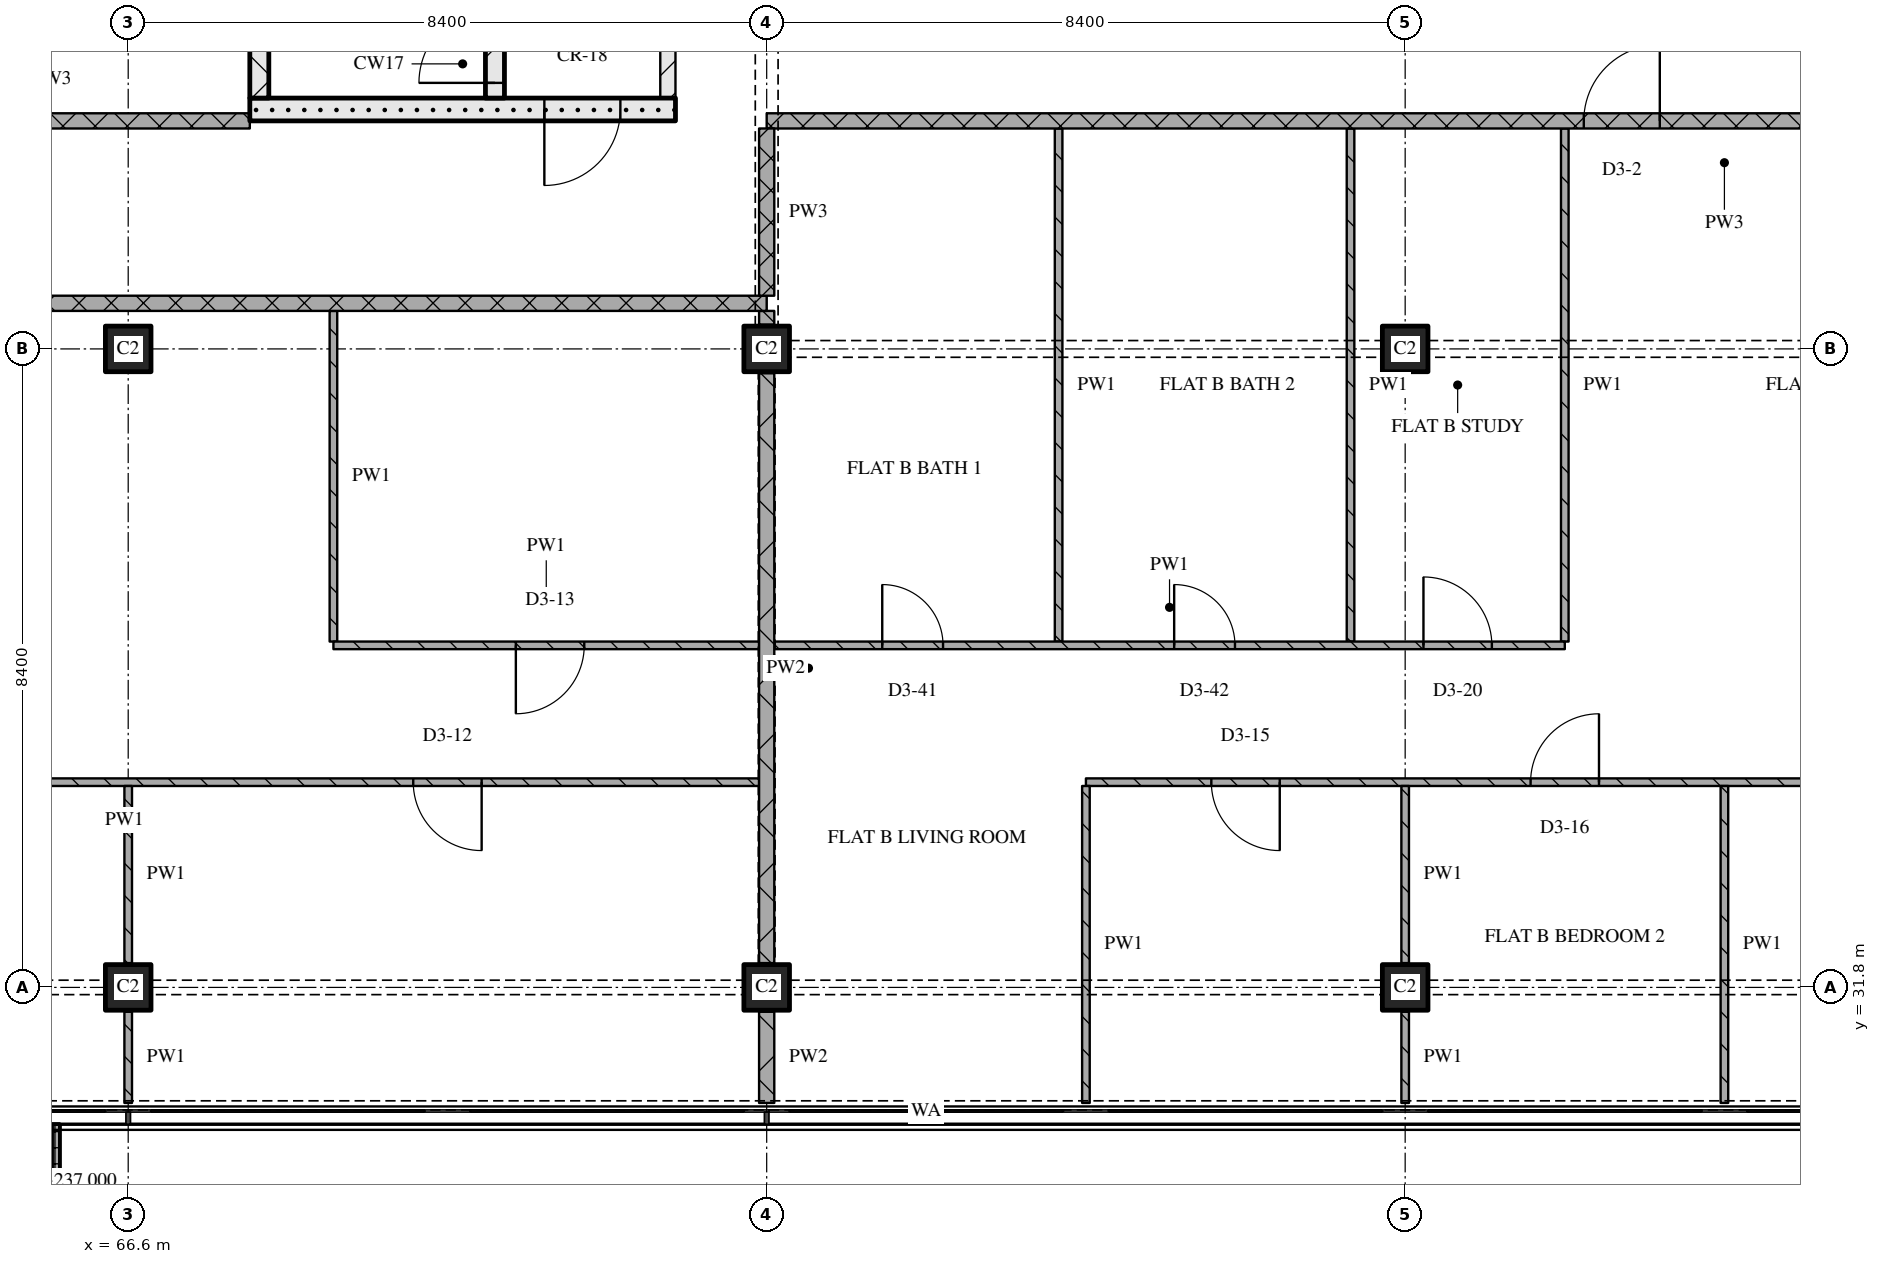
"""IFC4 building model, lengths in metres.
Left out: names, types, materials, properties, quantities, classifications, styles, units other than length and angle.
Written with IfcOpenShell. Run it as: python <this file> out.ifc"""

import sys

from ifc_helpers import new_model, si_unit, direction, frame, frame_2d, origin, origin_2d, place, context, subcontext, project, spatial, polyline, rectangle, outline, extrude, element, fill, save


model = new_model("IFC4")
c1 = context("Model", 3, precision=1e-05, world=origin(), true_north=direction((0.0, 1.0)))
c2 = subcontext(c1, "Body", "Model", "MODEL_VIEW")
j1 = project(units=[si_unit("LENGTHUNIT", "METRE"), si_unit("PLANEANGLEUNIT", "RADIAN")], contexts=[c1])
p1 = place(None, origin())
s1 = spatial("IfcSite", under=j1, at=p1, CompositionType="ELEMENT")
p2 = place(p1, origin())
s2 = spatial("IfcBuilding", under=s1, at=p2, CompositionType="ELEMENT")
p3 = place(p2, frame((0.0, 0.0, 234.3)))
s3 = spatial("IfcBuildingStorey", under=s2, at=p3, CompositionType="ELEMENT", Elevation=234.3)
for number, where, z_axis, x_axis in (
    (1, (66.6, 31.8, 0.0), (0.0, 0.0, 1.0), (1.0, 0.0, 0.0)),
    (2, (66.6, 40.2, 0.0), (0.0, 0.0, 1.0), (1.0, 0.0, 0.0)),
    (3, (75.0, 31.8, 0.0), (0.0, 0.0, 1.0), (1.0, 0.0, 0.0)),
    (4, (75.0, 40.2, 0.0), (0.0, 0.0, 1.0), (1.0, 0.0, 0.0)),
    (5, (83.4, 31.8, 0.0), (0.0, 0.0, 1.0), (1.0, 0.0, 0.0)),
    (6, (83.4, 40.2, 0.0), (0.0, 0.0, 1.0), (1.0, 0.0, 0.0)),
):
    element("IfcColumn", number, at=place(p3, frame(where, z_axis=z_axis, x_axis=x_axis)), inside=s3, PredefinedType="COLUMN", context=c2, shape_type="SweptSolid", body=[
        extrude(rectangle(XDim=0.6, YDim=0.6, at=origin_2d()), origin(), (0.0, 0.0, 1.0), 3.6),
    ])
p4 = place(p3, origin())
e7 = element("IfcWall", 7, at=p4, inside=s3, PredefinedType="SOLIDWALL", context=c2, shape_type="SweptSolid", body=[
    extrude(outline(polyline([(63.3, 30.0), (63.4, 30.0), (63.4, 28.5), (65.6, 28.5), (65.6, 30.0), (65.7, 30.0), (65.7, 28.4), (63.3, 28.4), (63.3, 30.0)])), origin(), (0.0, 0.0, 1.0), 1.0),
])
p5 = place(p3, frame((68.2, 43.35, 0.0), z_axis=(0.0, 0.0, 1.0), x_axis=(1.0, 0.0, 0.0)))
e8 = element("IfcWall", 8, at=p5, inside=s3, PredefinedType="SOLIDWALL", context=c2, shape_type="SweptSolid", body=[
    extrude(rectangle(XDim=5.6, YDim=0.3, at=frame_2d((2.8, 0.0))), origin(), (0.0, 0.0, 1.0), 3.32),
])
p6 = place(p5, frame((3.875, 0.0, 0.0)))
e9 = element("IfcOpeningElement", 9, at=p6, cuts=e8, PredefinedType="OPENING", context=c2, shape_type="SweptSolid", body=[
    extrude(rectangle(XDim=1.0, YDim=2.1, at=frame_2d((0.5, 1.05))), frame((0.0, 0.16, 0.0), z_axis=(0.0, -1.0, 0.0), x_axis=(1.0, 0.0, 0.0)), (0.0, 0.0, 1.0), 0.32),
])
p7 = place(p3, frame((68.325, 43.5, 0.0), z_axis=(0.0, 0.0, 1.0), x_axis=(0.0, 1.0, 0.0)))
e10 = element("IfcWall", 10, at=p7, inside=s3, PredefinedType="SOLIDWALL", context=c2, shape_type="SweptSolid", body=[
    extrude(rectangle(XDim=6.9, YDim=0.25, at=frame_2d((3.45, 0.0))), origin(), (0.0, 0.0, 1.0), 3.32),
])
p8 = place(p3, frame((71.425, 43.5, 0.0), z_axis=(0.0, 0.0, 1.0), x_axis=(0.0, 1.0, 0.0)))
e11 = element("IfcWall", 11, at=p8, inside=s3, PredefinedType="SOLIDWALL", context=c2, shape_type="SweptSolid", body=[
    extrude(rectangle(XDim=6.9, YDim=0.25, at=frame_2d((3.45, 0.0))), origin(), (0.0, 0.0, 1.0), 3.32),
])
p9 = place(p8, frame((0.2, 0.0, 0.0)))
e12 = element("IfcOpeningElement", 12, at=p9, cuts=e11, PredefinedType="OPENING", context=c2, shape_type="SweptSolid", body=[
    extrude(rectangle(XDim=1.0, YDim=2.1, at=frame_2d((0.5, 1.05))), frame((0.0, 0.135, 0.0), z_axis=(0.0, -1.0, 0.0), x_axis=(1.0, 0.0, 0.0)), (0.0, 0.0, 1.0), 0.27),
])
p10 = place(p3, frame((73.7, 43.5, 0.0), z_axis=(0.0, 0.0, 1.0), x_axis=(0.0, 1.0, 0.0)))
e13 = element("IfcWall", 13, at=p10, inside=s3, PredefinedType="PARTITIONING", context=c2, shape_type="SweptSolid", body=[
    extrude(rectangle(XDim=6.9, YDim=0.2, at=frame_2d((3.45, 0.0))), origin(), (0.0, 0.0, 1.0), 3.32),
])
p11 = place(p10, frame((1.0, 0.0, 0.0)))
e14 = element("IfcOpeningElement", 14, at=p11, cuts=e13, PredefinedType="OPENING", context=c2, shape_type="SweptSolid", body=[
    extrude(rectangle(XDim=1.0, YDim=2.1, at=frame_2d((0.5, 1.05))), frame((0.0, 0.11, 0.0), z_axis=(0.0, -1.0, 0.0), x_axis=(1.0, 0.0, 0.0)), (0.0, 0.0, 1.0), 0.22),
])
p12 = place(p3, frame((74.9, 34.5, 0.0), z_axis=(0.0, 0.0, 1.0), x_axis=(-1.0, 0.0, 0.0)))
e15 = element("IfcWall", 15, at=p12, inside=s3, PredefinedType="PARTITIONING", context=c2, shape_type="SweptSolid", body=[
    extrude(rectangle(XDim=16.7, YDim=0.1, at=frame_2d((8.35, 0.0))), origin(), (0.0, 0.0, 1.0), 3.32),
])
p13 = place(p12, frame((3.65, 0.0, 0.0)))
e16 = element("IfcOpeningElement", 16, at=p13, cuts=e15, PredefinedType="OPENING", context=c2, shape_type="SweptSolid", body=[
    extrude(rectangle(XDim=0.9, YDim=2.1, at=frame_2d((0.45, 1.05))), frame((0.0, 0.06, 0.0), z_axis=(0.0, -1.0, 0.0), x_axis=(1.0, 0.0, 0.0)), (0.0, 0.0, 1.0), 0.12),
])
p14 = place(p12, frame((12.05, 0.0, 0.0)))
e17 = element("IfcOpeningElement", 17, at=p14, cuts=e15, PredefinedType="OPENING", context=c2, shape_type="SweptSolid", body=[
    extrude(rectangle(XDim=0.9, YDim=2.1, at=frame_2d((0.45, 1.05))), frame((0.0, 0.06, 0.0), z_axis=(0.0, -1.0, 0.0), x_axis=(1.0, 0.0, 0.0)), (0.0, 0.0, 1.0), 0.12),
])
p15 = place(p3, frame((100.1, 34.5, 0.0), z_axis=(0.0, 0.0, 1.0), x_axis=(-1.0, 0.0, 0.0)))
e18 = element("IfcWall", 18, at=p15, inside=s3, PredefinedType="PARTITIONING", context=c2, shape_type="SweptSolid", body=[
    extrude(rectangle(XDim=20.9, YDim=0.1, at=frame_2d((10.45, 0.0))), origin(), (0.0, 0.0, 1.0), 3.32),
])
p16 = place(p15, frame((3.65, 0.0, 0.0)))
e19 = element("IfcOpeningElement", 19, at=p16, cuts=e18, PredefinedType="OPENING", context=c2, shape_type="SweptSolid", body=[
    extrude(rectangle(XDim=0.9, YDim=2.1, at=frame_2d((0.45, 1.05))), frame((0.0, 0.06, 0.0), z_axis=(0.0, -1.0, 0.0), x_axis=(1.0, 0.0, 0.0)), (0.0, 0.0, 1.0), 0.12),
])
p17 = place(p15, frame((9.95, 0.0, 0.0)))
e20 = element("IfcOpeningElement", 20, at=p17, cuts=e18, PredefinedType="OPENING", context=c2, shape_type="SweptSolid", body=[
    extrude(rectangle(XDim=0.9, YDim=2.1, at=frame_2d((0.45, 1.05))), frame((0.0, 0.06, 0.0), z_axis=(0.0, -1.0, 0.0), x_axis=(1.0, 0.0, 0.0)), (0.0, 0.0, 1.0), 0.12),
])
p18 = place(p15, frame((14.15, 0.0, 0.0)))
e21 = element("IfcOpeningElement", 21, at=p18, cuts=e18, PredefinedType="OPENING", context=c2, shape_type="SweptSolid", body=[
    extrude(rectangle(XDim=0.9, YDim=2.1, at=frame_2d((0.45, 1.05))), frame((0.0, 0.06, 0.0), z_axis=(0.0, -1.0, 0.0), x_axis=(1.0, 0.0, 0.0)), (0.0, 0.0, 1.0), 0.12),
])
p19 = place(p15, frame((18.35, 0.0, 0.0)))
e22 = element("IfcOpeningElement", 22, at=p19, cuts=e18, PredefinedType="OPENING", context=c2, shape_type="SweptSolid", body=[
    extrude(rectangle(XDim=0.9, YDim=2.1, at=frame_2d((0.45, 1.05))), frame((0.0, 0.06, 0.0), z_axis=(0.0, -1.0, 0.0), x_axis=(1.0, 0.0, 0.0)), (0.0, 0.0, 1.0), 0.12),
])
p20 = place(p3, frame((75.0, 40.8, 0.0), z_axis=(0.0, 0.0, 1.0), x_axis=(-1.0, 0.0, 0.0)))
e23 = element("IfcWall", 23, at=p20, inside=s3, PredefinedType="PARTITIONING", context=c2, shape_type="SweptSolid", body=[
    extrude(rectangle(XDim=24.38, YDim=0.2, at=frame_2d((12.19, 0.0))), origin(), (0.0, 0.0, 1.0), 3.32),
])
p21 = place(p20, frame((13.45, 0.0, 0.0)))
e24 = element("IfcOpeningElement", 24, at=p21, cuts=e23, PredefinedType="OPENING", context=c2, shape_type="SweptSolid", body=[
    extrude(rectangle(XDim=1.0, YDim=2.1, at=frame_2d((0.5, 1.05))), frame((0.0, 0.11, 0.0), z_axis=(0.0, -1.0, 0.0), x_axis=(1.0, 0.0, 0.0)), (0.0, 0.0, 1.0), 0.22),
])
p22 = place(p3, frame((63.0, 43.2, 0.0), z_axis=(0.0, 0.0, 1.0), x_axis=(1.0, 0.0, 0.0)))
e25 = element("IfcWall", 25, at=p22, inside=s3, PredefinedType="PARTITIONING", context=c2, shape_type="SweptSolid", body=[
    extrude(rectangle(XDim=5.2, YDim=0.2, at=frame_2d((2.6, 0.0))), origin(), (0.0, 0.0, 1.0), 3.32),
])
p23 = place(p3, frame((100.2, 43.2, 0.0), z_axis=(0.0, 0.0, 1.0), x_axis=(-1.0, 0.0, 0.0)))
e26 = element("IfcWall", 26, at=p23, inside=s3, PredefinedType="PARTITIONING", context=c2, shape_type="SweptSolid", body=[
    extrude(rectangle(XDim=25.2, YDim=0.2, at=frame_2d((12.6, 0.0))), origin(), (0.0, 0.0, 1.0), 3.32),
])
p24 = place(p23, frame((13.45, 0.0, 0.0)))
e27 = element("IfcOpeningElement", 27, at=p24, cuts=e26, PredefinedType="OPENING", context=c2, shape_type="SweptSolid", body=[
    extrude(rectangle(XDim=1.0, YDim=2.1, at=frame_2d((0.5, 1.05))), frame((0.0, 0.11, 0.0), z_axis=(0.0, -1.0, 0.0), x_axis=(1.0, 0.0, 0.0)), (0.0, 0.0, 1.0), 0.22),
])
p25 = place(p3, frame((66.6, 31.48, 0.0), z_axis=(0.0, 0.0, 1.0), x_axis=(0.0, -1.0, 0.0)))
e28 = element("IfcWall", 28, at=p25, inside=s3, PredefinedType="PARTITIONING", context=c2, shape_type="SweptSolid", body=[
    extrude(rectangle(XDim=1.2, YDim=0.1, at=frame_2d((0.6, 0.0))), origin(), (0.0, 0.0, 1.0), 3.32),
])
p26 = place(p3, frame((66.6, 34.45, 0.0), z_axis=(0.0, 0.0, 1.0), x_axis=(0.0, -1.0, 0.0)))
e29 = element("IfcWall", 29, at=p26, inside=s3, PredefinedType="PARTITIONING", context=c2, shape_type="SweptSolid", body=[
    extrude(rectangle(XDim=2.33, YDim=0.1, at=frame_2d((1.165, 0.0))), origin(), (0.0, 0.0, 1.0), 3.32),
])
p27 = place(p3, frame((69.3, 40.7, 0.0), z_axis=(0.0, 0.0, 1.0), x_axis=(0.0, -1.0, 0.0)))
e30 = element("IfcWall", 30, at=p27, inside=s3, PredefinedType="PARTITIONING", context=c2, shape_type="SweptSolid", body=[
    extrude(rectangle(XDim=4.35, YDim=0.1, at=frame_2d((2.175, 0.0))), origin(), (0.0, 0.0, 1.0), 3.32),
])
p28 = place(p3, frame((75.0, 43.1, 0.0), z_axis=(0.0, 0.0, 1.0), x_axis=(0.0, -1.0, 0.0)))
e31 = element("IfcWall", 31, at=p28, inside=s3, PredefinedType="PARTITIONING", context=c2, shape_type="SweptSolid", body=[
    extrude(rectangle(XDim=2.2, YDim=0.2, at=frame_2d((1.1, 0.0))), origin(), (0.0, 0.0, 1.0), 2.53),
])
p29 = place(p3, frame((75.0, 31.48, 0.0), z_axis=(0.0, 0.0, 1.0), x_axis=(0.0, -1.0, 0.0)))
e32 = element("IfcWall", 32, at=p29, inside=s3, PredefinedType="PARTITIONING", context=c2, shape_type="SweptSolid", body=[
    extrude(rectangle(XDim=1.2, YDim=0.2, at=frame_2d((0.6, 0.0))), origin(), (0.0, 0.0, 1.0), 3.32),
])
p30 = place(p3, frame((75.0, 39.88, 0.0), z_axis=(0.0, 0.0, 1.0), x_axis=(0.0, -1.0, 0.0)))
e33 = element("IfcWall", 33, at=p30, inside=s3, PredefinedType="PARTITIONING", context=c2, shape_type="SweptSolid", body=[
    extrude(rectangle(XDim=7.76, YDim=0.2, at=frame_2d((3.88, 0.0))), origin(), (0.0, 0.0, 1.0), 2.72),
])
p31 = place(p3, frame((75.0, 40.7, 0.0), z_axis=(0.0, 0.0, 1.0), x_axis=(0.0, -1.0, 0.0)))
e34 = element("IfcWall", 34, at=p31, inside=s3, PredefinedType="PARTITIONING", context=c2, shape_type="SweptSolid", body=[
    extrude(rectangle(XDim=0.18, YDim=0.2, at=frame_2d((0.09, 0.0))), origin(), (0.0, 0.0, 1.0), 3.32),
])
p32 = place(p3, frame((78.841, 43.1, 0.0), z_axis=(0.0, 0.0, 1.0), x_axis=(0.0, -1.0, 0.0)))
e35 = element("IfcWall", 35, at=p32, inside=s3, PredefinedType="PARTITIONING", context=c2, shape_type="SweptSolid", body=[
    extrude(rectangle(XDim=6.75, YDim=0.1, at=frame_2d((3.375, 0.0))), origin(), (0.0, 0.0, 1.0), 3.32),
])
p33 = place(p3, frame((79.2, 34.45, 0.0), z_axis=(0.0, 0.0, 1.0), x_axis=(0.0, -1.0, 0.0)))
e36 = element("IfcWall", 36, at=p33, inside=s3, PredefinedType="PARTITIONING", context=c2, shape_type="SweptSolid", body=[
    extrude(rectangle(XDim=4.17, YDim=0.1, at=frame_2d((2.085, 0.0))), origin(), (0.0, 0.0, 1.0), 3.32),
])
p34 = place(p3, frame((82.681, 43.1, 0.0), z_axis=(0.0, 0.0, 1.0), x_axis=(0.0, -1.0, 0.0)))
e37 = element("IfcWall", 37, at=p34, inside=s3, PredefinedType="PARTITIONING", context=c2, shape_type="SweptSolid", body=[
    extrude(rectangle(XDim=6.75, YDim=0.1, at=frame_2d((3.375, 0.0))), origin(), (0.0, 0.0, 1.0), 3.32),
])
p35 = place(p3, frame((83.4, 31.48, 0.0), z_axis=(0.0, 0.0, 1.0), x_axis=(0.0, -1.0, 0.0)))
e38 = element("IfcWall", 38, at=p35, inside=s3, PredefinedType="PARTITIONING", context=c2, shape_type="SweptSolid", body=[
    extrude(rectangle(XDim=1.2, YDim=0.1, at=frame_2d((0.6, 0.0))), origin(), (0.0, 0.0, 1.0), 3.32),
])
p36 = place(p3, frame((83.4, 34.45, 0.0), z_axis=(0.0, 0.0, 1.0), x_axis=(0.0, -1.0, 0.0)))
e39 = element("IfcWall", 39, at=p36, inside=s3, PredefinedType="PARTITIONING", context=c2, shape_type="SweptSolid", body=[
    extrude(rectangle(XDim=2.33, YDim=0.1, at=frame_2d((1.165, 0.0))), origin(), (0.0, 0.0, 1.0), 3.32),
])
p37 = place(p3, frame((85.5, 43.1, 0.0), z_axis=(0.0, 0.0, 1.0), x_axis=(0.0, -1.0, 0.0)))
e40 = element("IfcWall", 40, at=p37, inside=s3, PredefinedType="PARTITIONING", context=c2, shape_type="SweptSolid", body=[
    extrude(rectangle(XDim=6.75, YDim=0.1, at=frame_2d((3.375, 0.0))), origin(), (0.0, 0.0, 1.0), 3.32),
])
p38 = place(p3, frame((87.6, 34.45, 0.0), z_axis=(0.0, 0.0, 1.0), x_axis=(0.0, -1.0, 0.0)))
e41 = element("IfcWall", 41, at=p38, inside=s3, PredefinedType="PARTITIONING", context=c2, shape_type="SweptSolid", body=[
    extrude(rectangle(XDim=4.17, YDim=0.1, at=frame_2d((2.085, 0.0))), origin(), (0.0, 0.0, 1.0), 3.32),
])
p39 = place(p3, frame((69.3, 36.3, 0.0), z_axis=(0.0, 0.0, 1.0), x_axis=(1.0, 0.0, 0.0)))
e42 = element("IfcWall", 42, at=p39, inside=s3, PredefinedType="PARTITIONING", context=c2, shape_type="SweptSolid", body=[
    extrude(rectangle(XDim=5.6, YDim=0.1, at=frame_2d((2.8, 0.0))), origin(), (0.0, 0.0, 1.0), 3.32),
])
p40 = place(p39, frame((2.4, 0.0, 0.0)))
e43 = element("IfcOpeningElement", 43, at=p40, cuts=e42, PredefinedType="OPENING", context=c2, shape_type="SweptSolid", body=[
    extrude(rectangle(XDim=0.9, YDim=2.1, at=frame_2d((0.45, 1.05))), frame((0.0, 0.06, 0.0), z_axis=(0.0, -1.0, 0.0), x_axis=(1.0, 0.0, 0.0)), (0.0, 0.0, 1.0), 0.12),
])
p41 = place(p3, frame((75.1, 36.3, 0.0), z_axis=(0.0, 0.0, 1.0), x_axis=(1.0, 0.0, 0.0)))
e44 = element("IfcWall", 44, at=p41, inside=s3, PredefinedType="PARTITIONING", context=c2, shape_type="SweptSolid", body=[
    extrude(rectangle(XDim=10.4, YDim=0.1, at=frame_2d((5.2, 0.0))), origin(), (0.0, 0.0, 1.0), 3.32),
])
p42 = place(p41, frame((1.42, 0.0, 0.0)))
e45 = element("IfcOpeningElement", 45, at=p42, cuts=e44, PredefinedType="OPENING", context=c2, shape_type="SweptSolid", body=[
    extrude(rectangle(XDim=0.8, YDim=2.1, at=frame_2d((0.4, 1.05))), frame((0.0, 0.06, 0.0), z_axis=(0.0, -1.0, 0.0), x_axis=(1.0, 0.0, 0.0)), (0.0, 0.0, 1.0), 0.12),
])
p43 = place(p41, frame((5.261, 0.0, 0.0)))
e46 = element("IfcOpeningElement", 46, at=p43, cuts=e44, PredefinedType="OPENING", context=c2, shape_type="SweptSolid", body=[
    extrude(rectangle(XDim=0.8, YDim=2.1, at=frame_2d((0.4, 1.05))), frame((0.0, 0.06, 0.0), z_axis=(0.0, -1.0, 0.0), x_axis=(1.0, 0.0, 0.0)), (0.0, 0.0, 1.0), 0.12),
])
p44 = place(p41, frame((8.541, 0.0, 0.0)))
e47 = element("IfcOpeningElement", 47, at=p44, cuts=e44, PredefinedType="OPENING", context=c2, shape_type="SweptSolid", body=[
    extrude(rectangle(XDim=0.9, YDim=2.1, at=frame_2d((0.45, 1.05))), frame((0.0, 0.06, 0.0), z_axis=(0.0, -1.0, 0.0), x_axis=(1.0, 0.0, 0.0)), (0.0, 0.0, 1.0), 0.12),
])
p45 = place(p6, origin())
e48 = element("IfcDoor", 48, at=p45, inside=s3, OperationType="SINGLE_SWING_RIGHT", PredefinedType="DOOR", context=c2, shape_type="SweptSolid", body=[
    extrude(rectangle(XDim=1.0, YDim=2.1, at=frame_2d((0.5, 1.05))), frame((0.0, 0.025, 0.0), z_axis=(0.0, -1.0, 0.0), x_axis=(1.0, 0.0, 0.0)), (0.0, 0.0, 1.0), 0.05),
])
fill(e9, e48)
p46 = place(p9, origin())
e49 = element("IfcDoor", 49, at=p46, inside=s3, OperationType="SINGLE_SWING_LEFT", PredefinedType="DOOR", context=c2, shape_type="SweptSolid", body=[
    extrude(rectangle(XDim=1.0, YDim=2.1, at=frame_2d((0.5, 1.05))), frame((0.0, 0.025, 0.0), z_axis=(0.0, -1.0, 0.0), x_axis=(1.0, 0.0, 0.0)), (0.0, 0.0, 1.0), 0.05),
])
fill(e12, e49)
p47 = place(p13, origin())
e50 = element("IfcDoor", 50, at=p47, inside=s3, OperationType="SINGLE_SWING_LEFT", PredefinedType="DOOR", context=c2, shape_type="SweptSolid", body=[
    extrude(rectangle(XDim=0.9, YDim=2.1, at=frame_2d((0.45, 1.05))), frame((0.0, 0.025, 0.0), z_axis=(0.0, -1.0, 0.0), x_axis=(1.0, 0.0, 0.0)), (0.0, 0.0, 1.0), 0.05),
])
fill(e16, e50)
p48 = place(p18, origin())
e51 = element("IfcDoor", 51, at=p48, inside=s3, OperationType="SINGLE_SWING_RIGHT", PredefinedType="DOOR", context=c2, shape_type="SweptSolid", body=[
    extrude(rectangle(XDim=0.9, YDim=2.1, at=frame_2d((0.45, 1.05))), frame((0.0, 0.025, 0.0), z_axis=(0.0, -1.0, 0.0), x_axis=(1.0, 0.0, 0.0)), (0.0, 0.0, 1.0), 0.05),
])
fill(e21, e51)
p49 = place(p19, origin())
e52 = element("IfcDoor", 52, at=p49, inside=s3, OperationType="SINGLE_SWING_LEFT", PredefinedType="DOOR", context=c2, shape_type="SweptSolid", body=[
    extrude(rectangle(XDim=0.9, YDim=2.1, at=frame_2d((0.45, 1.05))), frame((0.0, 0.025, 0.0), z_axis=(0.0, -1.0, 0.0), x_axis=(1.0, 0.0, 0.0)), (0.0, 0.0, 1.0), 0.05),
])
fill(e22, e52)
p50 = place(p24, origin())
e53 = element("IfcDoor", 53, at=p50, inside=s3, OperationType="SINGLE_SWING_RIGHT", PredefinedType="DOOR", context=c2, shape_type="SweptSolid", body=[
    extrude(rectangle(XDim=1.0, YDim=2.1, at=frame_2d((0.5, 1.05))), frame((0.0, 0.025, 0.0), z_axis=(0.0, -1.0, 0.0), x_axis=(1.0, 0.0, 0.0)), (0.0, 0.0, 1.0), 0.05),
])
fill(e27, e53)
p51 = place(p40, origin())
e54 = element("IfcDoor", 54, at=p51, inside=s3, OperationType="SINGLE_SWING_RIGHT", PredefinedType="DOOR", context=c2, shape_type="SweptSolid", body=[
    extrude(rectangle(XDim=0.9, YDim=2.1, at=frame_2d((0.45, 1.05))), frame((0.0, 0.025, 0.0), z_axis=(0.0, -1.0, 0.0), x_axis=(1.0, 0.0, 0.0)), (0.0, 0.0, 1.0), 0.05),
])
fill(e43, e54)
p52 = place(p42, origin())
e55 = element("IfcDoor", 55, at=p52, inside=s3, OperationType="SINGLE_SWING_LEFT", PredefinedType="DOOR", context=c2, shape_type="SweptSolid", body=[
    extrude(rectangle(XDim=0.8, YDim=2.1, at=frame_2d((0.4, 1.05))), frame((0.0, 0.025, 0.0), z_axis=(0.0, -1.0, 0.0), x_axis=(1.0, 0.0, 0.0)), (0.0, 0.0, 1.0), 0.05),
])
fill(e45, e55)
p53 = place(p43, origin())
e56 = element("IfcDoor", 56, at=p53, inside=s3, OperationType="SINGLE_SWING_LEFT", PredefinedType="DOOR", context=c2, shape_type="SweptSolid", body=[
    extrude(rectangle(XDim=0.8, YDim=2.1, at=frame_2d((0.4, 1.05))), frame((0.0, 0.025, 0.0), z_axis=(0.0, -1.0, 0.0), x_axis=(1.0, 0.0, 0.0)), (0.0, 0.0, 1.0), 0.05),
])
fill(e46, e56)
p54 = place(p44, origin())
e57 = element("IfcDoor", 57, at=p54, inside=s3, OperationType="SINGLE_SWING_LEFT", PredefinedType="DOOR", context=c2, shape_type="SweptSolid", body=[
    extrude(rectangle(XDim=0.9, YDim=2.1, at=frame_2d((0.45, 1.05))), frame((0.0, 0.025, 0.0), z_axis=(0.0, -1.0, 0.0), x_axis=(1.0, 0.0, 0.0)), (0.0, 0.0, 1.0), 0.05),
])
fill(e47, e57)
save(model, sys.argv[1])
